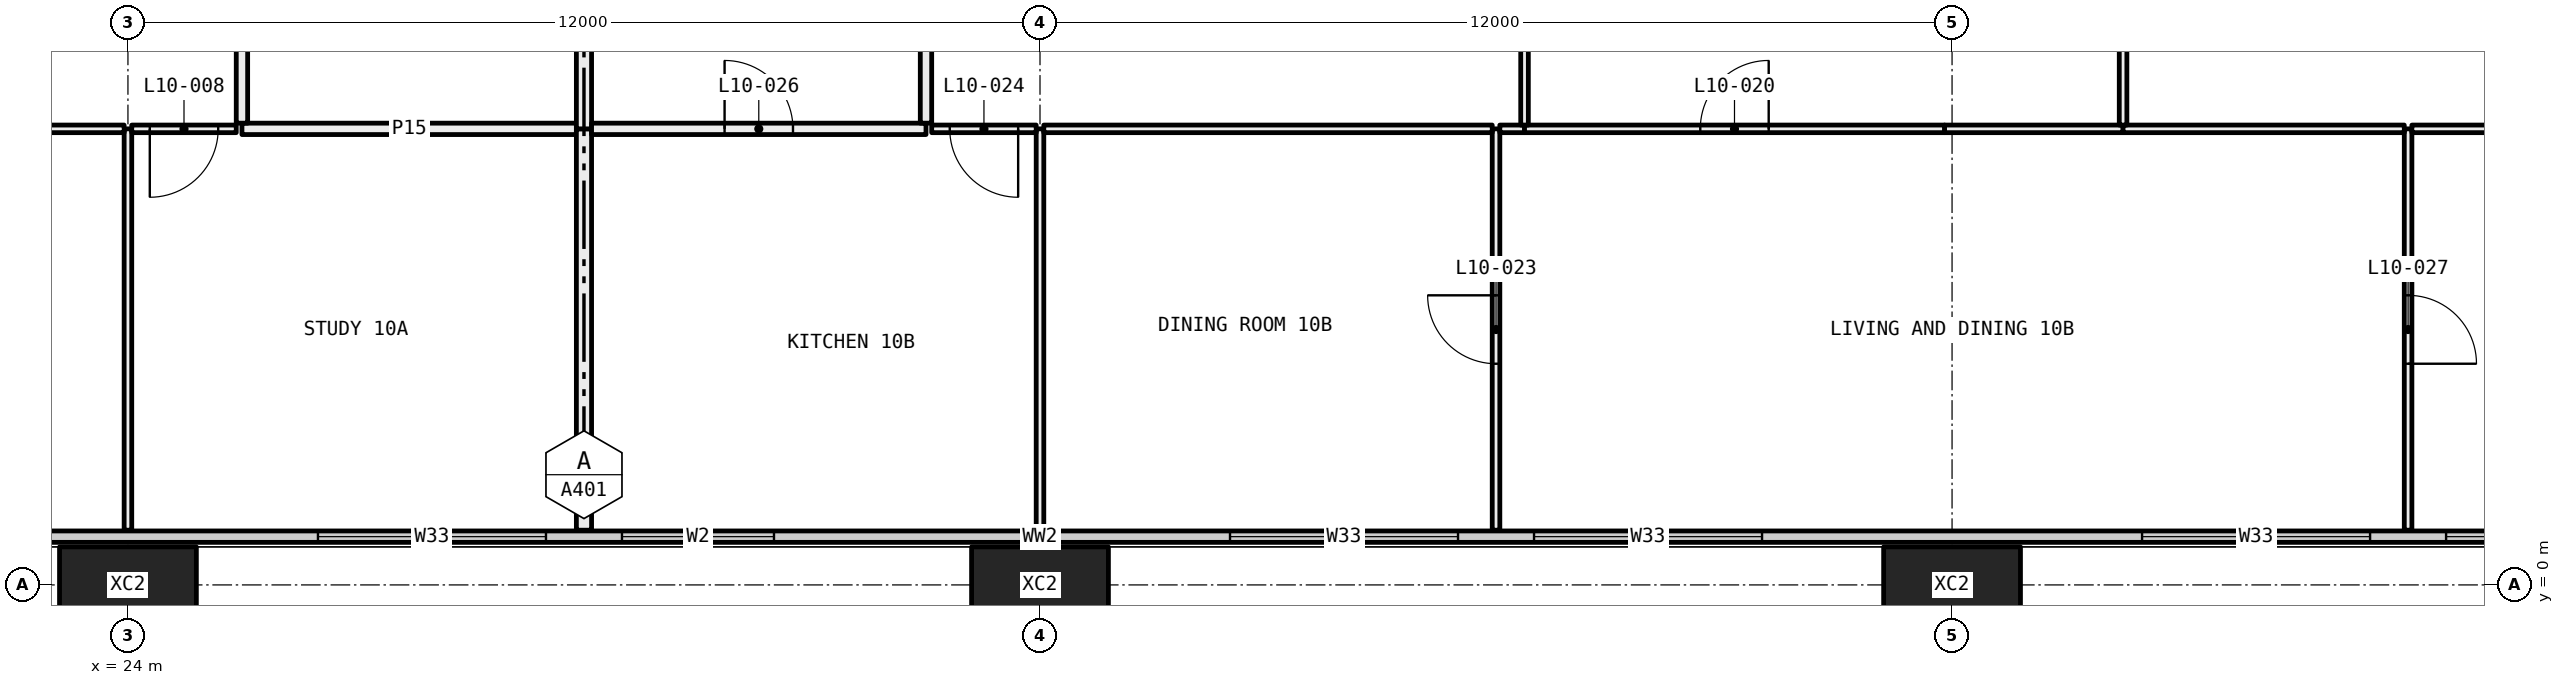
"""IFC4 building model, lengths in metres.
Left out: names, types, materials, properties, quantities, classifications, styles, units other than length and angle.
Written with IfcOpenShell. Run it as: python <this file> out.ifc"""

import sys

from ifc_helpers import new_model, si_unit, direction, frame, frame_2d, origin, origin_2d, place, context, subcontext, project, spatial, rectangle, hollow_rectangle, extrude, element, fill, save


model = new_model("IFC4")
c1 = context("Model", 3, precision=1e-05, world=origin(), true_north=direction((0.0, 1.0)))
c2 = subcontext(c1, "Body", "Model", "MODEL_VIEW")
j1 = project(units=[si_unit("LENGTHUNIT", "METRE"), si_unit("PLANEANGLEUNIT", "RADIAN")], contexts=[c1])
p1 = place(None, origin())
s1 = spatial("IfcSite", under=j1, at=p1, CompositionType="ELEMENT")
p2 = place(p1, origin())
s2 = spatial("IfcBuilding", under=s1, at=p2, CompositionType="ELEMENT")
p3 = place(p2, frame((0.0, 0.0, 47.25)))
s3 = spatial("IfcBuildingStorey", under=s2, at=p3, CompositionType="ELEMENT", Elevation=47.25)
for number, where, z_axis, x_axis in (
    (1, (24.0, 0.0, -0.4), (0.0, 0.0, 1.0), (1.0, 0.0, 0.0)),
    (2, (36.0, 0.0, -0.4), (0.0, 0.0, 1.0), (1.0, 0.0, 0.0)),
    (3, (48.0, 0.0, -0.4), (0.0, 0.0, 1.0), (1.0, 0.0, 0.0)),
):
    element("IfcColumn", number, at=place(p3, frame(where, z_axis=z_axis, x_axis=x_axis)), inside=s3, PredefinedType="COLUMN", context=c2, shape_type="SweptSolid", body=[
        extrude(hollow_rectangle(XDim=1.8, YDim=1.0, WallThickness=0.07, at=origin_2d()), origin(), (0.0, 0.0, 1.0), 3.45),
    ])
p4 = place(p3, frame((6.56, 0.635, 0.0), z_axis=(0.0, 0.0, 1.0), x_axis=(1.0, 0.0, 0.0)))
e4 = element("IfcWall", 4, at=p4, inside=s3, PredefinedType="ELEMENTEDWALL", context=c2, shape_type="SweptSolid", body=[
    extrude(rectangle(XDim=58.88, YDim=0.15, at=frame_2d((29.44, 0.0))), origin(), (0.0, 0.0, 1.0), 3.05),
])
p5 = place(p4, frame((0.44, 0.0, 0.45)))
e5 = element("IfcOpeningElement", 5, at=p5, cuts=e4, PredefinedType="OPENING", context=c2, shape_type="SweptSolid", body=[
    extrude(rectangle(XDim=4.5, YDim=2.55, at=frame_2d((2.25, 1.275))), frame((0.0, 0.085, 0.0), z_axis=(0.0, -1.0, 0.0), x_axis=(1.0, 0.0, 0.0)), (0.0, 0.0, 1.0), 0.17),
])
p6 = place(p4, frame((7.94, 0.0, 0.45)))
e6 = element("IfcOpeningElement", 6, at=p6, cuts=e4, PredefinedType="OPENING", context=c2, shape_type="SweptSolid", body=[
    extrude(rectangle(XDim=3.0, YDim=2.55, at=frame_2d((1.5, 1.275))), frame((0.0, 0.085, 0.0), z_axis=(0.0, -1.0, 0.0), x_axis=(1.0, 0.0, 0.0)), (0.0, 0.0, 1.0), 0.17),
])
p7 = place(p4, frame((11.94, 0.0, 0.45)))
e7 = element("IfcOpeningElement", 7, at=p7, cuts=e4, PredefinedType="OPENING", context=c2, shape_type="SweptSolid", body=[
    extrude(rectangle(XDim=3.0, YDim=2.55, at=frame_2d((1.5, 1.275))), frame((0.0, 0.085, 0.0), z_axis=(0.0, -1.0, 0.0), x_axis=(1.0, 0.0, 0.0)), (0.0, 0.0, 1.0), 0.17),
])
p8 = place(p4, frame((19.94, 0.0, 0.45)))
e8 = element("IfcOpeningElement", 8, at=p8, cuts=e4, PredefinedType="OPENING", context=c2, shape_type="SweptSolid", body=[
    extrude(rectangle(XDim=3.0, YDim=2.55, at=frame_2d((1.5, 1.275))), frame((0.0, 0.085, 0.0), z_axis=(0.0, -1.0, 0.0), x_axis=(1.0, 0.0, 0.0)), (0.0, 0.0, 1.0), 0.17),
])
p9 = place(p4, frame((23.94, 0.0, 0.45)))
e9 = element("IfcOpeningElement", 9, at=p9, cuts=e4, PredefinedType="OPENING", context=c2, shape_type="SweptSolid", body=[
    extrude(rectangle(XDim=2.0, YDim=2.55, at=frame_2d((1.0, 1.275))), frame((0.0, 0.085, 0.0), z_axis=(0.0, -1.0, 0.0), x_axis=(1.0, 0.0, 0.0)), (0.0, 0.0, 1.0), 0.17),
])
p10 = place(p4, frame((31.94, 0.0, 0.45)))
e10 = element("IfcOpeningElement", 10, at=p10, cuts=e4, PredefinedType="OPENING", context=c2, shape_type="SweptSolid", body=[
    extrude(rectangle(XDim=3.0, YDim=2.55, at=frame_2d((1.5, 1.275))), frame((0.0, 0.085, 0.0), z_axis=(0.0, -1.0, 0.0), x_axis=(1.0, 0.0, 0.0)), (0.0, 0.0, 1.0), 0.17),
])
p11 = place(p4, frame((35.94, 0.0, 0.45)))
e11 = element("IfcOpeningElement", 11, at=p11, cuts=e4, PredefinedType="OPENING", context=c2, shape_type="SweptSolid", body=[
    extrude(rectangle(XDim=3.0, YDim=2.55, at=frame_2d((1.5, 1.275))), frame((0.0, 0.085, 0.0), z_axis=(0.0, -1.0, 0.0), x_axis=(1.0, 0.0, 0.0)), (0.0, 0.0, 1.0), 0.17),
])
p12 = place(p4, frame((43.94, 0.0, 0.45)))
e12 = element("IfcOpeningElement", 12, at=p12, cuts=e4, PredefinedType="OPENING", context=c2, shape_type="SweptSolid", body=[
    extrude(rectangle(XDim=3.0, YDim=2.55, at=frame_2d((1.5, 1.275))), frame((0.0, 0.085, 0.0), z_axis=(0.0, -1.0, 0.0), x_axis=(1.0, 0.0, 0.0)), (0.0, 0.0, 1.0), 0.17),
])
p13 = place(p4, frame((47.94, 0.0, 0.45)))
e13 = element("IfcOpeningElement", 13, at=p13, cuts=e4, PredefinedType="OPENING", context=c2, shape_type="SweptSolid", body=[
    extrude(rectangle(XDim=2.0, YDim=2.55, at=frame_2d((1.0, 1.275))), frame((0.0, 0.085, 0.0), z_axis=(0.0, -1.0, 0.0), x_axis=(1.0, 0.0, 0.0)), (0.0, 0.0, 1.0), 0.17),
])
p14 = place(p4, frame((53.94, 0.0, 0.45)))
e14 = element("IfcOpeningElement", 14, at=p14, cuts=e4, PredefinedType="OPENING", context=c2, shape_type="SweptSolid", body=[
    extrude(rectangle(XDim=4.5, YDim=2.55, at=frame_2d((2.25, 1.275))), frame((0.0, 0.085, 0.0), z_axis=(0.0, -1.0, 0.0), x_axis=(1.0, 0.0, 0.0)), (0.0, 0.0, 1.0), 0.17),
])
p15 = place(p3, frame((24.0, 0.72, 0.0), z_axis=(0.0, 0.0, 1.0), x_axis=(0.0, 1.0, 0.0)))
e15 = element("IfcWall", 15, at=p15, inside=s3, PredefinedType="PARTITIONING", context=c2, shape_type="SweptSolid", body=[
    extrude(rectangle(XDim=5.28, YDim=0.1, at=frame_2d((2.64, 0.0))), origin(), (0.0, 0.0, 1.0), 2.45),
])
p16 = place(p3, frame((23.95, 6.0, 0.0), z_axis=(0.0, 0.0, 1.0), x_axis=(-1.0, 0.0, 0.0)))
e16 = element("IfcWall", 16, at=p16, inside=s3, PredefinedType="PARTITIONING", context=c2, shape_type="SweptSolid", body=[
    extrude(rectangle(XDim=4.95, YDim=0.1, at=frame_2d((2.475, 0.0))), origin(), (0.0, 0.0, 1.0), 2.45),
])
p17 = place(p3, frame((25.425, 6.0, 0.0), z_axis=(0.0, 0.0, 1.0), x_axis=(-1.0, 0.0, 0.0)))
e17 = element("IfcWall", 17, at=p17, inside=s3, PredefinedType="PARTITIONING", context=c2, shape_type="SweptSolid", body=[
    extrude(rectangle(XDim=1.375, YDim=0.1, at=frame_2d((0.688, 0.0))), origin(), (0.0, 0.0, 1.0), 2.45),
])
p18 = place(p17, frame((0.238, 0.0, 0.0)))
e18 = element("IfcOpeningElement", 18, at=p18, cuts=e17, PredefinedType="OPENING", context=c2, shape_type="SweptSolid", body=[
    extrude(rectangle(XDim=0.9, YDim=2.1, at=frame_2d((0.45, 1.05))), frame((0.0, 0.06, 0.0), z_axis=(0.0, -1.0, 0.0), x_axis=(1.0, 0.0, 0.0)), (0.0, 0.0, 1.0), 0.12),
])
p19 = place(p3, frame((29.9, 6.0, 0.0), z_axis=(0.0, 0.0, 1.0), x_axis=(-1.0, 0.0, 0.0)))
e19 = element("IfcWall", 19, at=p19, inside=s3, PredefinedType="PARTITIONING", context=c2, shape_type="SweptSolid", body=[
    extrude(rectangle(XDim=4.4, YDim=0.15, at=frame_2d((2.2, 0.0))), origin(), (0.0, 0.0, 1.0), 3.05),
])
p20 = place(p3, frame((30.0, 0.72, 0.0), z_axis=(0.0, 0.0, 1.0), x_axis=(0.0, 1.0, 0.0)))
e20 = element("IfcWall", 20, at=p20, inside=s3, PredefinedType="PARTITIONING", context=c2, shape_type="SweptSolid", body=[
    extrude(rectangle(XDim=5.28, YDim=0.2, at=frame_2d((2.64, 0.0))), origin(), (0.0, 0.0, 1.0), 3.05),
])
p21 = place(p3, frame((25.5, 6.075, 0.0), z_axis=(0.0, 0.0, 1.0), x_axis=(0.0, 1.0, 0.0)))
e21 = element("IfcWall", 21, at=p21, inside=s3, PredefinedType="PARTITIONING", context=c2, shape_type="SweptSolid", body=[
    extrude(rectangle(XDim=2.925, YDim=0.15, at=frame_2d((1.462, 0.0))), origin(), (0.0, 0.0, 1.0), 3.05),
])
p22 = place(p21, frame((1.012, 0.0, 0.0)))
e22 = element("IfcOpeningElement", 22, at=p22, cuts=e21, PredefinedType="OPENING", context=c2, shape_type="SweptSolid", body=[
    extrude(rectangle(XDim=0.9, YDim=2.1, at=frame_2d((0.45, 1.05))), frame((0.0, 0.085, 0.0), z_axis=(0.0, -1.0, 0.0), x_axis=(1.0, 0.0, 0.0)), (0.0, 0.0, 1.0), 0.17),
])
p23 = place(p3, frame((30.0, 6.0, 0.0), z_axis=(0.0, 0.0, 1.0), x_axis=(0.0, 1.0, 0.0)))
e23 = element("IfcWall", 23, at=p23, inside=s3, PredefinedType="PARTITIONING", context=c2, shape_type="SweptSolid", body=[
    extrude(rectangle(XDim=3.0, YDim=0.2, at=frame_2d((1.5, 0.0))), origin(), (0.0, 0.0, 1.0), 3.05),
])
p24 = place(p3, frame((36.0, 0.72, 0.0), z_axis=(0.0, 0.0, 1.0), x_axis=(0.0, 1.0, 0.0)))
e24 = element("IfcWall", 24, at=p24, inside=s3, PredefinedType="PARTITIONING", context=c2, shape_type="SweptSolid", body=[
    extrude(rectangle(XDim=5.28, YDim=0.1, at=frame_2d((2.64, 0.0))), origin(), (0.0, 0.0, 1.0), 2.45),
])
p25 = place(p3, frame((34.5, 6.0, 0.0), z_axis=(0.0, 0.0, 1.0), x_axis=(-1.0, 0.0, 0.0)))
e25 = element("IfcWall", 25, at=p25, inside=s3, PredefinedType="PARTITIONING", context=c2, shape_type="SweptSolid", body=[
    extrude(rectangle(XDim=4.4, YDim=0.15, at=frame_2d((2.2, 0.0))), origin(), (0.0, 0.0, 1.0), 3.05),
])
p26 = place(p25, frame((1.75, 0.0, 0.0)))
e26 = element("IfcOpeningElement", 26, at=p26, cuts=e25, PredefinedType="OPENING", context=c2, shape_type="SweptSolid", body=[
    extrude(rectangle(XDim=0.9, YDim=2.1, at=frame_2d((0.45, 1.05))), frame((0.0, 0.085, 0.0), z_axis=(0.0, -1.0, 0.0), x_axis=(1.0, 0.0, 0.0)), (0.0, 0.0, 1.0), 0.17),
])
p27 = place(p3, frame((35.95, 6.0, 0.0), z_axis=(0.0, 0.0, 1.0), x_axis=(-1.0, 0.0, 0.0)))
e27 = element("IfcWall", 27, at=p27, inside=s3, PredefinedType="PARTITIONING", context=c2, shape_type="SweptSolid", body=[
    extrude(rectangle(XDim=1.375, YDim=0.1, at=frame_2d((0.688, 0.0))), origin(), (0.0, 0.0, 1.0), 2.45),
])
p28 = place(p27, frame((0.238, 0.0, 0.0)))
e28 = element("IfcOpeningElement", 28, at=p28, cuts=e27, PredefinedType="OPENING", context=c2, shape_type="SweptSolid", body=[
    extrude(rectangle(XDim=0.9, YDim=2.1, at=frame_2d((0.45, 1.05))), frame((0.0, 0.06, 0.0), z_axis=(0.0, -1.0, 0.0), x_axis=(1.0, 0.0, 0.0)), (0.0, 0.0, 1.0), 0.12),
])
p29 = place(p3, frame((42.0, 0.72, 0.0), z_axis=(0.0, 0.0, 1.0), x_axis=(0.0, 1.0, 0.0)))
e29 = element("IfcWall", 29, at=p29, inside=s3, PredefinedType="PARTITIONING", context=c2, shape_type="SweptSolid", body=[
    extrude(rectangle(XDim=5.28, YDim=0.1, at=frame_2d((2.64, 0.0))), origin(), (0.0, 0.0, 1.0), 3.05),
])
p30 = place(p29, frame((2.19, 0.0, 0.0)))
e30 = element("IfcOpeningElement", 30, at=p30, cuts=e29, PredefinedType="OPENING", context=c2, shape_type="SweptSolid", body=[
    extrude(rectangle(XDim=0.9, YDim=2.1, at=frame_2d((0.45, 1.05))), frame((0.0, 0.06, 0.0), z_axis=(0.0, -1.0, 0.0), x_axis=(1.0, 0.0, 0.0)), (0.0, 0.0, 1.0), 0.12),
])
p31 = place(p3, frame((41.95, 6.0, 0.0), z_axis=(0.0, 0.0, 1.0), x_axis=(-1.0, 0.0, 0.0)))
e31 = element("IfcWall", 31, at=p31, inside=s3, PredefinedType="PARTITIONING", context=c2, shape_type="SweptSolid", body=[
    extrude(rectangle(XDim=5.9, YDim=0.1, at=frame_2d((2.95, 0.0))), origin(), (0.0, 0.0, 1.0), 2.45),
])
p32 = place(p3, frame((54.0, 0.72, 0.0), z_axis=(0.0, 0.0, 1.0), x_axis=(0.0, 1.0, 0.0)))
e32 = element("IfcWall", 32, at=p32, inside=s3, PredefinedType="PARTITIONING", context=c2, shape_type="SweptSolid", body=[
    extrude(rectangle(XDim=5.28, YDim=0.1, at=frame_2d((2.64, 0.0))), origin(), (0.0, 0.0, 1.0), 3.05),
])
p33 = place(p32, frame((2.19, 0.0, 0.0)))
e33 = element("IfcOpeningElement", 33, at=p33, cuts=e32, PredefinedType="OPENING", context=c2, shape_type="SweptSolid", body=[
    extrude(rectangle(XDim=0.9, YDim=2.1, at=frame_2d((0.45, 1.05))), frame((0.0, 0.06, 0.0), z_axis=(0.0, -1.0, 0.0), x_axis=(1.0, 0.0, 0.0)), (0.0, 0.0, 1.0), 0.12),
])
p34 = place(p3, frame((42.375, 6.0, 0.0), z_axis=(0.0, 0.0, 1.0), x_axis=(-1.0, 0.0, 0.0)))
e34 = element("IfcWall", 34, at=p34, inside=s3, PredefinedType="PARTITIONING", context=c2, shape_type="SweptSolid", body=[
    extrude(rectangle(XDim=0.325, YDim=0.1, at=frame_2d((0.163, 0.0))), origin(), (0.0, 0.0, 1.0), 3.05),
])
p35 = place(p3, frame((50.25, 6.0, 0.0), z_axis=(0.0, 0.0, 1.0), x_axis=(-1.0, 0.0, 0.0)))
e35 = element("IfcWall", 35, at=p35, inside=s3, PredefinedType="PARTITIONING", context=c2, shape_type="SweptSolid", body=[
    extrude(rectangle(XDim=2.35, YDim=0.1, at=frame_2d((1.175, 0.0))), origin(), (0.0, 0.0, 1.0), 2.45),
])
p36 = place(p3, frame((47.9, 6.0, 0.0), z_axis=(0.0, 0.0, 1.0), x_axis=(-1.0, 0.0, 0.0)))
e36 = element("IfcWall", 36, at=p36, inside=s3, PredefinedType="PARTITIONING", context=c2, shape_type="SweptSolid", body=[
    extrude(rectangle(XDim=5.525, YDim=0.1, at=frame_2d((2.762, 0.0))), origin(), (0.0, 0.0, 1.0), 3.05),
])
p37 = place(p36, frame((2.312, 0.0, 0.0)))
e37 = element("IfcOpeningElement", 37, at=p37, cuts=e36, PredefinedType="OPENING", context=c2, shape_type="SweptSolid", body=[
    extrude(rectangle(XDim=0.9, YDim=2.1, at=frame_2d((0.45, 1.05))), frame((0.0, 0.06, 0.0), z_axis=(0.0, -1.0, 0.0), x_axis=(1.0, 0.0, 0.0)), (0.0, 0.0, 1.0), 0.12),
])
p38 = place(p3, frame((53.95, 6.0, 0.0), z_axis=(0.0, 0.0, 1.0), x_axis=(-1.0, 0.0, 0.0)))
e38 = element("IfcWall", 38, at=p38, inside=s3, PredefinedType="PARTITIONING", context=c2, shape_type="SweptSolid", body=[
    extrude(rectangle(XDim=3.7, YDim=0.1, at=frame_2d((1.85, 0.0))), origin(), (0.0, 0.0, 1.0), 3.05),
])
p39 = place(p3, frame((58.125, 6.0, 0.0), z_axis=(0.0, 0.0, 1.0), x_axis=(-1.0, 0.0, 0.0)))
e39 = element("IfcWall", 39, at=p39, inside=s3, PredefinedType="PARTITIONING", context=c2, shape_type="SweptSolid", body=[
    extrude(rectangle(XDim=4.075, YDim=0.1, at=frame_2d((2.038, 0.0))), origin(), (0.0, 0.0, 1.0), 3.05),
])
p40 = place(p3, frame((34.5, 6.075, 0.0), z_axis=(0.0, 0.0, 1.0), x_axis=(0.0, 1.0, 0.0)))
e40 = element("IfcWall", 40, at=p40, inside=s3, PredefinedType="PARTITIONING", context=c2, shape_type="SweptSolid", body=[
    extrude(rectangle(XDim=2.85, YDim=0.15, at=frame_2d((1.425, 0.0))), origin(), (0.0, 0.0, 1.0), 3.05),
])
p41 = place(p3, frame((42.375, 6.05, 0.0), z_axis=(0.0, 0.0, 1.0), x_axis=(0.0, 1.0, 0.0)))
e41 = element("IfcWall", 41, at=p41, inside=s3, PredefinedType="PARTITIONING", context=c2, shape_type="SweptSolid", body=[
    extrude(rectangle(XDim=5.95, YDim=0.1, at=frame_2d((2.975, 0.0))), origin(), (0.0, 0.0, 1.0), 2.45),
])
p42 = place(p41, frame((2.525, 0.0, 0.0)))
e42 = element("IfcOpeningElement", 42, at=p42, cuts=e41, PredefinedType="OPENING", context=c2, shape_type="SweptSolid", body=[
    extrude(rectangle(XDim=0.9, YDim=2.1, at=frame_2d((0.45, 1.05))), frame((0.0, 0.06, 0.0), z_axis=(0.0, -1.0, 0.0), x_axis=(1.0, 0.0, 0.0)), (0.0, 0.0, 1.0), 0.12),
])
p43 = place(p3, frame((50.25, 6.05, 0.0), z_axis=(0.0, 0.0, 1.0), x_axis=(0.0, 1.0, 0.0)))
e43 = element("IfcWall", 43, at=p43, inside=s3, PredefinedType="PARTITIONING", context=c2, shape_type="SweptSolid", body=[
    extrude(rectangle(XDim=5.95, YDim=0.1, at=frame_2d((2.975, 0.0))), origin(), (0.0, 0.0, 1.0), 2.45),
])
p44 = place(p8, origin())
e44 = element("IfcWindow", 44, at=p44, inside=s3, PartitioningType="SINGLE_PANEL", PredefinedType="WINDOW", context=c2, shape_type="SweptSolid", body=[
    extrude(rectangle(XDim=3.0, YDim=2.55, at=frame_2d((1.5, 1.275))), frame((0.0, 0.03, 0.0), z_axis=(0.0, -1.0, 0.0), x_axis=(1.0, 0.0, 0.0)), (0.0, 0.0, 1.0), 0.06),
])
fill(e8, e44)
p45 = place(p9, origin())
e45 = element("IfcWindow", 45, at=p45, inside=s3, PartitioningType="SINGLE_PANEL", PredefinedType="WINDOW", context=c2, shape_type="SweptSolid", body=[
    extrude(rectangle(XDim=2.0, YDim=2.55, at=frame_2d((1.0, 1.275))), frame((0.0, 0.03, 0.0), z_axis=(0.0, -1.0, 0.0), x_axis=(1.0, 0.0, 0.0)), (0.0, 0.0, 1.0), 0.06),
])
fill(e9, e45)
p46 = place(p10, origin())
e46 = element("IfcWindow", 46, at=p46, inside=s3, PartitioningType="SINGLE_PANEL", PredefinedType="WINDOW", context=c2, shape_type="SweptSolid", body=[
    extrude(rectangle(XDim=3.0, YDim=2.55, at=frame_2d((1.5, 1.275))), frame((0.0, 0.03, 0.0), z_axis=(0.0, -1.0, 0.0), x_axis=(1.0, 0.0, 0.0)), (0.0, 0.0, 1.0), 0.06),
])
fill(e10, e46)
p47 = place(p11, origin())
e47 = element("IfcWindow", 47, at=p47, inside=s3, PartitioningType="SINGLE_PANEL", PredefinedType="WINDOW", context=c2, shape_type="SweptSolid", body=[
    extrude(rectangle(XDim=3.0, YDim=2.55, at=frame_2d((1.5, 1.275))), frame((0.0, 0.03, 0.0), z_axis=(0.0, -1.0, 0.0), x_axis=(1.0, 0.0, 0.0)), (0.0, 0.0, 1.0), 0.06),
])
fill(e11, e47)
p48 = place(p12, origin())
e48 = element("IfcWindow", 48, at=p48, inside=s3, PartitioningType="SINGLE_PANEL", PredefinedType="WINDOW", context=c2, shape_type="SweptSolid", body=[
    extrude(rectangle(XDim=3.0, YDim=2.55, at=frame_2d((1.5, 1.275))), frame((0.0, 0.03, 0.0), z_axis=(0.0, -1.0, 0.0), x_axis=(1.0, 0.0, 0.0)), (0.0, 0.0, 1.0), 0.06),
])
fill(e12, e48)
p49 = place(p13, origin())
e49 = element("IfcWindow", 49, at=p49, inside=s3, PartitioningType="SINGLE_PANEL", PredefinedType="WINDOW", context=c2, shape_type="SweptSolid", body=[
    extrude(rectangle(XDim=2.0, YDim=2.55, at=frame_2d((1.0, 1.275))), frame((0.0, 0.03, 0.0), z_axis=(0.0, -1.0, 0.0), x_axis=(1.0, 0.0, 0.0)), (0.0, 0.0, 1.0), 0.06),
])
fill(e13, e49)
p50 = place(p18, origin())
e50 = element("IfcDoor", 50, at=p50, inside=s3, OperationType="SINGLE_SWING_LEFT", PredefinedType="DOOR", context=c2, shape_type="SweptSolid", body=[
    extrude(rectangle(XDim=0.9, YDim=2.1, at=frame_2d((0.45, 1.05))), frame((0.0, 0.025, 0.0), z_axis=(0.0, -1.0, 0.0), x_axis=(1.0, 0.0, 0.0)), (0.0, 0.0, 1.0), 0.05),
])
fill(e18, e50)
p51 = place(p37, frame((0.9, 0.0, 0.0), x_axis=(-1.0, 0.0, 0.0)))
e51 = element("IfcDoor", 51, at=p51, inside=s3, OperationType="SINGLE_SWING_LEFT", PredefinedType="DOOR", context=c2, shape_type="SweptSolid", body=[
    extrude(rectangle(XDim=0.9, YDim=2.1, at=frame_2d((0.45, 1.05))), frame((0.0, 0.025, 0.0), z_axis=(0.0, -1.0, 0.0), x_axis=(1.0, 0.0, 0.0)), (0.0, 0.0, 1.0), 0.05),
])
fill(e37, e51)
p52 = place(p30, origin())
e52 = element("IfcDoor", 52, at=p52, inside=s3, OperationType="SINGLE_SWING_LEFT", PredefinedType="DOOR", context=c2, shape_type="SweptSolid", body=[
    extrude(rectangle(XDim=0.9, YDim=2.1, at=frame_2d((0.45, 1.05))), frame((0.0, 0.025, 0.0), z_axis=(0.0, -1.0, 0.0), x_axis=(1.0, 0.0, 0.0)), (0.0, 0.0, 1.0), 0.05),
])
fill(e30, e52)
p53 = place(p28, origin())
e53 = element("IfcDoor", 53, at=p53, inside=s3, OperationType="SINGLE_SWING_RIGHT", PredefinedType="DOOR", context=c2, shape_type="SweptSolid", body=[
    extrude(rectangle(XDim=0.9, YDim=2.1, at=frame_2d((0.45, 1.05))), frame((0.0, 0.025, 0.0), z_axis=(0.0, -1.0, 0.0), x_axis=(1.0, 0.0, 0.0)), (0.0, 0.0, 1.0), 0.05),
])
fill(e28, e53)
p54 = place(p26, frame((0.9, 0.0, 0.0), x_axis=(-1.0, 0.0, 0.0)))
e54 = element("IfcDoor", 54, at=p54, inside=s3, OperationType="SINGLE_SWING_RIGHT", PredefinedType="DOOR", context=c2, shape_type="SweptSolid", body=[
    extrude(rectangle(XDim=0.9, YDim=2.1, at=frame_2d((0.45, 1.05))), frame((0.0, 0.025, 0.0), z_axis=(0.0, -1.0, 0.0), x_axis=(1.0, 0.0, 0.0)), (0.0, 0.0, 1.0), 0.05),
])
fill(e26, e54)
p55 = place(p33, frame((0.9, 0.0, 0.0), x_axis=(-1.0, 0.0, 0.0)))
e55 = element("IfcDoor", 55, at=p55, inside=s3, OperationType="SINGLE_SWING_LEFT", PredefinedType="DOOR", context=c2, shape_type="SweptSolid", body=[
    extrude(rectangle(XDim=0.9, YDim=2.1, at=frame_2d((0.45, 1.05))), frame((0.0, 0.025, 0.0), z_axis=(0.0, -1.0, 0.0), x_axis=(1.0, 0.0, 0.0)), (0.0, 0.0, 1.0), 0.05),
])
fill(e33, e55)
save(model, sys.argv[1])
